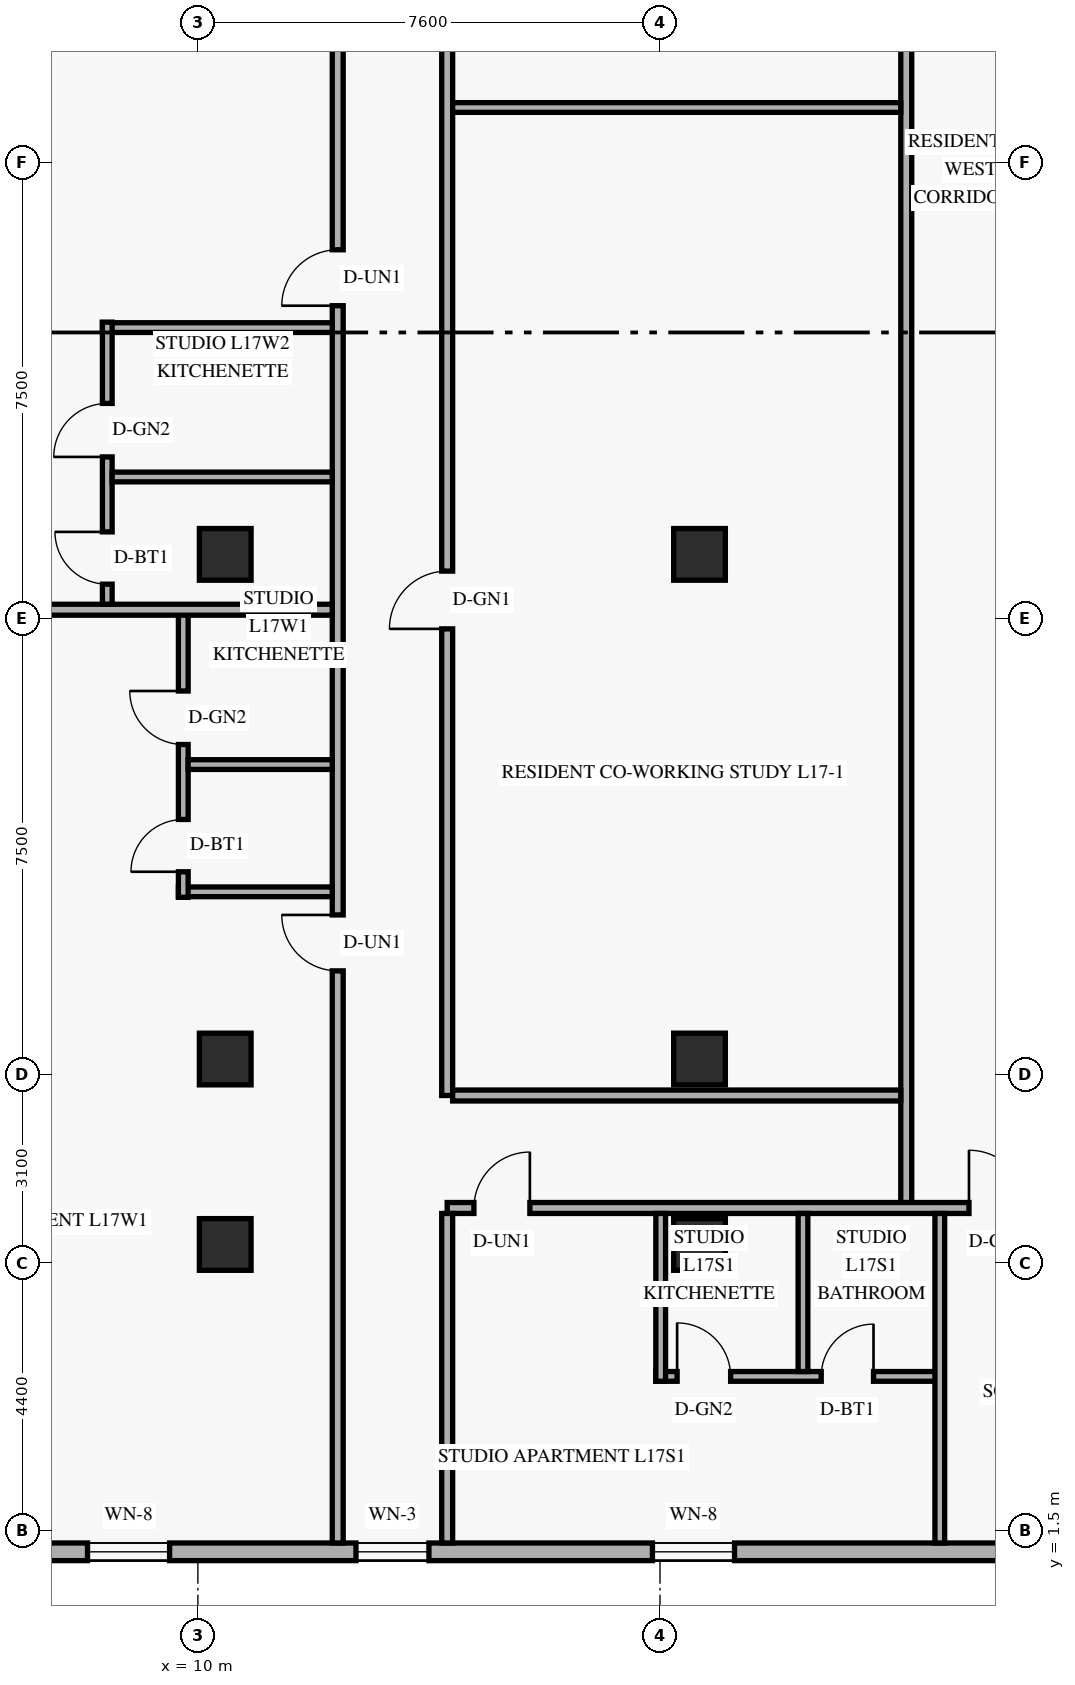
"""IFC4 building model, lengths in metres.
Left out: names, types, materials, properties, quantities, classifications, styles, units other than length and angle.
Written with IfcOpenShell. Run it as: python <this file> out.ifc"""

import sys

from ifc_helpers import new_model, si_unit, direction, frame, frame_2d, origin, origin_2d, place, context, subcontext, project, spatial, rectangle, extrude, element, fill, save


model = new_model("IFC4")
c1 = context("Model", 3, precision=1e-05, world=origin(), true_north=direction((0.0, 1.0)))
c2 = subcontext(c1, "Body", "Model", "MODEL_VIEW")
j1 = project(units=[si_unit("LENGTHUNIT", "METRE"), si_unit("PLANEANGLEUNIT", "RADIAN")], contexts=[c1])
p1 = place(None, origin())
s1 = spatial("IfcSite", under=j1, at=p1, CompositionType="ELEMENT")
p2 = place(p1, origin())
s2 = spatial("IfcBuilding", under=s1, at=p2, CompositionType="ELEMENT")
p3 = place(p2, frame((0.0, 0.0, 67.8)))
s3 = spatial("IfcBuildingStorey", under=s2, at=p3, CompositionType="ELEMENT", Elevation=67.8)
for number, where, z_axis, x_axis in (
    (1, (10.45, 6.2, 0.0), (0.0, 0.0, 1.0), (1.0, 0.0, 0.0)),
    (2, (10.45, 9.25, 0.0), (0.0, 0.0, 1.0), (1.0, 0.0, 0.0)),
    (3, (10.45, 17.55, 0.0), (0.0, 0.0, 1.0), (1.0, 0.0, 0.0)),
    (4, (18.25, 6.2, 0.0), (0.0, 0.0, 1.0), (1.0, 0.0, 0.0)),
    (5, (18.25, 9.25, 0.0), (0.0, 0.0, 1.0), (1.0, 0.0, 0.0)),
    (6, (18.25, 17.55, 0.0), (0.0, 0.0, 1.0), (1.0, 0.0, 0.0)),
):
    element("IfcColumn", number, at=place(p3, frame(where, z_axis=z_axis, x_axis=x_axis)), inside=s3, PredefinedType="COLUMN", context=c2, shape_type="SweptSolid", body=[
        extrude(rectangle(XDim=0.85, YDim=0.85, at=origin_2d()), origin(), (0.0, 0.0, 1.0), 3.6),
    ])
p4 = place(p3, frame((5.42, 1.145, 0.0), z_axis=(0.0, 0.0, 1.0), x_axis=(1.0, 0.0, 0.0)))
e7 = element("IfcWall", 7, at=p4, inside=s3, PredefinedType="SOLIDWALL", context=c2, shape_type="SweptSolid", body=[
    extrude(rectangle(XDim=39.56, YDim=0.29, at=frame_2d((19.78, 0.0))), origin(), (0.0, 0.0, 1.0), 3.3),
])
p5 = place(p4, frame((2.765, 0.0, 0.85)))
e8 = element("IfcOpeningElement", 8, at=p5, cuts=e7, PredefinedType="OPENING", context=c2, shape_type="SweptSolid", body=[
    extrude(rectangle(XDim=1.35, YDim=1.55, at=frame_2d((0.675, 0.775))), frame((0.0, 0.155, 0.0), z_axis=(0.0, -1.0, 0.0), x_axis=(1.0, 0.0, 0.0)), (0.0, 0.0, 1.0), 0.31),
])
p6 = place(p4, frame((7.18, 0.0, 0.85)))
e9 = element("IfcOpeningElement", 9, at=p6, cuts=e7, PredefinedType="OPENING", context=c2, shape_type="SweptSolid", body=[
    extrude(rectangle(XDim=1.2, YDim=1.5, at=frame_2d((0.6, 0.75))), frame((0.0, 0.155, 0.0), z_axis=(0.0, -1.0, 0.0), x_axis=(1.0, 0.0, 0.0)), (0.0, 0.0, 1.0), 0.31),
])
p7 = place(p4, frame((12.056, 0.0, 0.85)))
e10 = element("IfcOpeningElement", 10, at=p7, cuts=e7, PredefinedType="OPENING", context=c2, shape_type="SweptSolid", body=[
    extrude(rectangle(XDim=1.35, YDim=1.55, at=frame_2d((0.675, 0.775))), frame((0.0, 0.155, 0.0), z_axis=(0.0, -1.0, 0.0), x_axis=(1.0, 0.0, 0.0)), (0.0, 0.0, 1.0), 0.31),
])
p8 = place(p4, frame((18.665, 0.0, 0.85)))
e11 = element("IfcOpeningElement", 11, at=p8, cuts=e7, PredefinedType="OPENING", context=c2, shape_type="SweptSolid", body=[
    extrude(rectangle(XDim=1.35, YDim=1.55, at=frame_2d((0.675, 0.775))), frame((0.0, 0.155, 0.0), z_axis=(0.0, -1.0, 0.0), x_axis=(1.0, 0.0, 0.0)), (0.0, 0.0, 1.0), 0.31),
])
p9 = place(p4, frame((25.274, 0.0, 0.85)))
e12 = element("IfcOpeningElement", 12, at=p9, cuts=e7, PredefinedType="OPENING", context=c2, shape_type="SweptSolid", body=[
    extrude(rectangle(XDim=1.35, YDim=1.55, at=frame_2d((0.675, 0.775))), frame((0.0, 0.155, 0.0), z_axis=(0.0, -1.0, 0.0), x_axis=(1.0, 0.0, 0.0)), (0.0, 0.0, 1.0), 0.31),
])
p10 = place(p4, frame((30.39, 0.0, 0.85)))
e13 = element("IfcOpeningElement", 13, at=p10, cuts=e7, PredefinedType="OPENING", context=c2, shape_type="SweptSolid", body=[
    extrude(rectangle(XDim=1.35, YDim=1.55, at=frame_2d((0.675, 0.775))), frame((0.0, 0.155, 0.0), z_axis=(0.0, -1.0, 0.0), x_axis=(1.0, 0.0, 0.0)), (0.0, 0.0, 1.0), 0.31),
])
p11 = place(p4, frame((35.17, 0.0, 0.85)))
e14 = element("IfcOpeningElement", 14, at=p11, cuts=e7, PredefinedType="OPENING", context=c2, shape_type="SweptSolid", body=[
    extrude(rectangle(XDim=1.35, YDim=1.55, at=frame_2d((0.675, 0.775))), frame((0.0, 0.155, 0.0), z_axis=(0.0, -1.0, 0.0), x_axis=(1.0, 0.0, 0.0)), (0.0, 0.0, 1.0), 0.31),
])
p12 = place(p3, frame((21.65, 6.8, 0.0), z_axis=(0.0, 0.0, 1.0), x_axis=(0.0, 1.0, 0.0)))
e15 = element("IfcWall", 15, at=p12, inside=s3, PredefinedType="STANDARD", context=c2, shape_type="SweptSolid", body=[
    extrude(rectangle(XDim=34.4, YDim=0.18, at=frame_2d((17.2, 0.0))), origin(), (0.0, 0.0, 1.0), 2.589),
])
p13 = place(p3, frame((14.1, 6.8, 0.0), z_axis=(0.0, 0.0, 1.0), x_axis=(1.0, 0.0, 0.0)))
e16 = element("IfcWall", 16, at=p13, inside=s3, PredefinedType="STANDARD", context=c2, shape_type="SweptSolid", body=[
    extrude(rectangle(XDim=21.32, YDim=0.18, at=frame_2d((10.66, 0.0))), origin(), (0.0, 0.0, 1.0), 2.589),
])
p14 = place(p13, frame((0.44, 0.0, 0.0)))
e17 = element("IfcOpeningElement", 17, at=p14, cuts=e16, PredefinedType="OPENING", context=c2, shape_type="SweptSolid", body=[
    extrude(rectangle(XDim=0.92, YDim=2.15, at=frame_2d((0.46, 1.075))), frame((0.0, 0.1, 0.0), z_axis=(0.0, -1.0, 0.0), x_axis=(1.0, 0.0, 0.0)), (0.0, 0.0, 1.0), 0.2),
])
p15 = place(p13, frame((8.582, 0.0, 0.0)))
e18 = element("IfcOpeningElement", 18, at=p15, cuts=e16, PredefinedType="OPENING", context=c2, shape_type="SweptSolid", body=[
    extrude(rectangle(XDim=0.95, YDim=2.15, at=frame_2d((0.475, 1.075))), frame((0.0, 0.1, 0.0), z_axis=(0.0, -1.0, 0.0), x_axis=(1.0, 0.0, 0.0)), (0.0, 0.0, 1.0), 0.2),
])
p16 = place(p13, frame((13.658, 0.0, 0.0)))
e19 = element("IfcOpeningElement", 19, at=p16, cuts=e16, PredefinedType="OPENING", context=c2, shape_type="SweptSolid", body=[
    extrude(rectangle(XDim=0.92, YDim=2.15, at=frame_2d((0.46, 1.075))), frame((0.0, 0.1, 0.0), z_axis=(0.0, -1.0, 0.0), x_axis=(1.0, 0.0, 0.0)), (0.0, 0.0, 1.0), 0.2),
])
p17 = place(p3, frame((12.3, 1.29, 0.0), z_axis=(0.0, 0.0, 1.0), x_axis=(0.0, 1.0, 0.0)))
e20 = element("IfcWall", 20, at=p17, inside=s3, PredefinedType="STANDARD", context=c2, shape_type="SweptSolid", body=[
    extrude(rectangle(XDim=45.42, YDim=0.18, at=frame_2d((22.71, 0.0))), origin(), (0.0, 0.0, 1.0), 2.589),
])
p18 = place(p17, frame((9.41, 0.0, 0.0)))
e21 = element("IfcOpeningElement", 21, at=p18, cuts=e20, PredefinedType="OPENING", context=c2, shape_type="SweptSolid", body=[
    extrude(rectangle(XDim=0.92, YDim=2.15, at=frame_2d((0.46, 1.075))), frame((0.0, 0.1, 0.0), z_axis=(0.0, -1.0, 0.0), x_axis=(1.0, 0.0, 0.0)), (0.0, 0.0, 1.0), 0.2),
])
p19 = place(p17, frame((20.35, 0.0, 0.0)))
e22 = element("IfcOpeningElement", 22, at=p19, cuts=e20, PredefinedType="OPENING", context=c2, shape_type="SweptSolid", body=[
    extrude(rectangle(XDim=0.92, YDim=2.15, at=frame_2d((0.46, 1.075))), frame((0.0, 0.1, 0.0), z_axis=(0.0, -1.0, 0.0), x_axis=(1.0, 0.0, 0.0)), (0.0, 0.0, 1.0), 0.2),
])
p20 = place(p17, frame((35.99, 0.0, 0.0)))
e23 = element("IfcOpeningElement", 23, at=p20, cuts=e20, PredefinedType="OPENING", context=c2, shape_type="SweptSolid", body=[
    extrude(rectangle(XDim=0.92, YDim=2.15, at=frame_2d((0.46, 1.075))), frame((0.0, 0.1, 0.0), z_axis=(0.0, -1.0, 0.0), x_axis=(1.0, 0.0, 0.0)), (0.0, 0.0, 1.0), 0.2),
])
p21 = place(p3, frame((14.1, 8.65, 0.0), z_axis=(0.0, 0.0, 1.0), x_axis=(0.0, 1.0, 0.0)))
e24 = element("IfcWall", 24, at=p21, inside=s3, PredefinedType="STANDARD", context=c2, shape_type="SweptSolid", body=[
    extrude(rectangle(XDim=30.7, YDim=0.18, at=frame_2d((15.35, 0.0))), origin(), (0.0, 0.0, 1.0), 2.589),
])
p22 = place(p21, frame((7.675, 0.0, 0.0)))
e25 = element("IfcOpeningElement", 25, at=p22, cuts=e24, PredefinedType="OPENING", context=c2, shape_type="SweptSolid", body=[
    extrude(rectangle(XDim=0.95, YDim=2.15, at=frame_2d((0.475, 1.075))), frame((0.0, 0.1, 0.0), z_axis=(0.0, -1.0, 0.0), x_axis=(1.0, 0.0, 0.0)), (0.0, 0.0, 1.0), 0.2),
])
p23 = place(p21, frame((23.025, 0.0, 0.0)))
e26 = element("IfcOpeningElement", 26, at=p23, cuts=e24, PredefinedType="OPENING", context=c2, shape_type="SweptSolid", body=[
    extrude(rectangle(XDim=0.95, YDim=2.15, at=frame_2d((0.475, 1.075))), frame((0.0, 0.1, 0.0), z_axis=(0.0, -1.0, 0.0), x_axis=(1.0, 0.0, 0.0)), (0.0, 0.0, 1.0), 0.2),
])
p24 = place(p3, frame((14.19, 8.65, 0.0), z_axis=(0.0, 0.0, 1.0), x_axis=(1.0, 0.0, 0.0)))
e27 = element("IfcWall", 27, at=p24, inside=s3, PredefinedType="STANDARD", context=c2, shape_type="SweptSolid", body=[
    extrude(rectangle(XDim=7.37, YDim=0.18, at=frame_2d((3.685, 0.0))), origin(), (0.0, 0.0, 1.0), 2.589),
])
p25 = place(p3, frame((14.1, 1.29, 0.0), z_axis=(0.0, 0.0, 1.0), x_axis=(0.0, 1.0, 0.0)))
e28 = element("IfcWall", 28, at=p25, inside=s3, PredefinedType="PARTITIONING", context=c2, shape_type="SweptSolid", body=[
    extrude(rectangle(XDim=5.42, YDim=0.18, at=frame_2d((2.71, 0.0))), origin(), (0.0, 0.0, 1.0), 2.749),
])
p26 = place(p3, frame((9.68, 12.0, 0.0), z_axis=(0.0, 0.0, 1.0), x_axis=(1.0, 0.0, 0.0)))
e29 = element("IfcWall", 29, at=p26, inside=s3, PredefinedType="PLUMBINGWALL", context=c2, shape_type="SweptSolid", body=[
    extrude(rectangle(XDim=2.53, YDim=0.16, at=frame_2d((1.265, 0.0))), origin(), (0.0, 0.0, 1.0), 2.589),
])
p27 = place(p3, frame((9.76, 11.91, 0.0), z_axis=(0.0, 0.0, 1.0), x_axis=(0.0, 1.0, 0.0)))
e30 = element("IfcWall", 30, at=p27, inside=s3, PredefinedType="PLUMBINGWALL", context=c2, shape_type="SweptSolid", body=[
    extrude(rectangle(XDim=4.73, YDim=0.16, at=frame_2d((2.365, 0.0))), origin(), (0.0, 0.0, 1.0), 2.872),
])
p28 = place(p27, frame((0.42, 0.0, 0.0)))
e31 = element("IfcOpeningElement", 31, at=p28, cuts=e30, PredefinedType="OPENING", context=c2, shape_type="SweptSolid", body=[
    extrude(rectangle(XDim=0.86, YDim=2.12, at=frame_2d((0.43, 1.06))), frame((0.0, 0.09, 0.0), z_axis=(0.0, -1.0, 0.0), x_axis=(1.0, 0.0, 0.0)), (0.0, 0.0, 1.0), 0.18),
])
p29 = place(p27, frame((2.513, 0.0, 0.0)))
e32 = element("IfcOpeningElement", 32, at=p29, cuts=e30, PredefinedType="OPENING", context=c2, shape_type="SweptSolid", body=[
    extrude(rectangle(XDim=0.88, YDim=2.12, at=frame_2d((0.44, 1.06))), frame((0.0, 0.09, 0.0), z_axis=(0.0, -1.0, 0.0), x_axis=(1.0, 0.0, 0.0)), (0.0, 0.0, 1.0), 0.18),
])
p30 = place(p3, frame((9.84, 14.093, 0.0), z_axis=(0.0, 0.0, 1.0), x_axis=(1.0, 0.0, 0.0)))
e33 = element("IfcWall", 33, at=p30, inside=s3, PredefinedType="PLUMBINGWALL", context=c2, shape_type="SweptSolid", body=[
    extrude(rectangle(XDim=2.37, YDim=0.16, at=frame_2d((1.185, 0.0))), origin(), (0.0, 0.0, 1.0), 2.589),
])
p31 = place(p3, frame((2.09, 16.64, 0.0), z_axis=(0.0, 0.0, 1.0), x_axis=(1.0, 0.0, 0.0)))
e34 = element("IfcWall", 34, at=p31, inside=s3, PredefinedType="PARTITIONING", context=c2, shape_type="SweptSolid", body=[
    extrude(rectangle(XDim=10.12, YDim=0.18, at=frame_2d((5.06, 0.0))), origin(), (0.0, 0.0, 1.0), 2.589),
])
p32 = place(p3, frame((8.43, 21.28, 0.0), z_axis=(0.0, 0.0, 1.0), x_axis=(1.0, 0.0, 0.0)))
e35 = element("IfcWall", 35, at=p32, inside=s3, PredefinedType="PLUMBINGWALL", context=c2, shape_type="SweptSolid", body=[
    extrude(rectangle(XDim=3.78, YDim=0.16, at=frame_2d((1.89, 0.0))), origin(), (0.0, 0.0, 1.0), 2.589),
])
p33 = place(p3, frame((8.51, 16.73, 0.0), z_axis=(0.0, 0.0, 1.0), x_axis=(0.0, 1.0, 0.0)))
e36 = element("IfcWall", 36, at=p33, inside=s3, PredefinedType="PLUMBINGWALL", context=c2, shape_type="SweptSolid", body=[
    extrude(rectangle(XDim=4.64, YDim=0.16, at=frame_2d((2.32, 0.0))), origin(), (0.0, 0.0, 1.0), 2.589),
])
p34 = place(p33, frame((0.33, 0.0, 0.0)))
e37 = element("IfcOpeningElement", 37, at=p34, cuts=e36, PredefinedType="OPENING", context=c2, shape_type="SweptSolid", body=[
    extrude(rectangle(XDim=0.86, YDim=2.12, at=frame_2d((0.43, 1.06))), frame((0.0, 0.09, 0.0), z_axis=(0.0, -1.0, 0.0), x_axis=(1.0, 0.0, 0.0)), (0.0, 0.0, 1.0), 0.18),
])
p35 = place(p33, frame((2.423, 0.0, 0.0)))
e38 = element("IfcOpeningElement", 38, at=p35, cuts=e36, PredefinedType="OPENING", context=c2, shape_type="SweptSolid", body=[
    extrude(rectangle(XDim=0.88, YDim=2.12, at=frame_2d((0.44, 1.06))), frame((0.0, 0.09, 0.0), z_axis=(0.0, -1.0, 0.0), x_axis=(1.0, 0.0, 0.0)), (0.0, 0.0, 1.0), 0.18),
])
p36 = place(p3, frame((8.59, 18.823, 0.0), z_axis=(0.0, 0.0, 1.0), x_axis=(1.0, 0.0, 0.0)))
e39 = element("IfcWall", 39, at=p36, inside=s3, PredefinedType="PLUMBINGWALL", context=c2, shape_type="SweptSolid", body=[
    extrude(rectangle(XDim=3.62, YDim=0.16, at=frame_2d((1.81, 0.0))), origin(), (0.0, 0.0, 1.0), 2.589),
])
p37 = place(p3, frame((14.19, 24.9, 0.0), z_axis=(0.0, 0.0, 1.0), x_axis=(1.0, 0.0, 0.0)))
e40 = element("IfcWall", 40, at=p37, inside=s3, PredefinedType="PARTITIONING", context=c2, shape_type="SweptSolid", body=[
    extrude(rectangle(XDim=7.37, YDim=0.16, at=frame_2d((3.685, 0.0))), origin(), (0.0, 0.0, 1.0), 2.589),
])
p38 = place(p3, frame((17.531, 4.03, 0.0), z_axis=(0.0, 0.0, 1.0), x_axis=(1.0, 0.0, 0.0)))
e41 = element("IfcWall", 41, at=p38, inside=s3, PredefinedType="PLUMBINGWALL", context=c2, shape_type="SweptSolid", body=[
    extrude(rectangle(XDim=4.67, YDim=0.16, at=frame_2d((2.335, 0.0))), origin(), (0.0, 0.0, 1.0), 3.3),
])
p39 = place(p38, frame((0.35, 0.0, 0.0)))
e42 = element("IfcOpeningElement", 42, at=p39, cuts=e41, PredefinedType="OPENING", context=c2, shape_type="SweptSolid", body=[
    extrude(rectangle(XDim=0.88, YDim=2.12, at=frame_2d((0.44, 1.06))), frame((0.0, 0.09, 0.0), z_axis=(0.0, -1.0, 0.0), x_axis=(1.0, 0.0, 0.0)), (0.0, 0.0, 1.0), 0.18),
])
p40 = place(p38, frame((2.72, 0.0, 0.0)))
e43 = element("IfcOpeningElement", 43, at=p40, cuts=e41, PredefinedType="OPENING", context=c2, shape_type="SweptSolid", body=[
    extrude(rectangle(XDim=0.86, YDim=2.12, at=frame_2d((0.43, 1.06))), frame((0.0, 0.09, 0.0), z_axis=(0.0, -1.0, 0.0), x_axis=(1.0, 0.0, 0.0)), (0.0, 0.0, 1.0), 0.18),
])
p41 = place(p3, frame((17.612, 3.95, 0.0), z_axis=(0.0, 0.0, 1.0), x_axis=(0.0, 1.0, 0.0)))
e44 = element("IfcWall", 44, at=p41, inside=s3, PredefinedType="PLUMBINGWALL", context=c2, shape_type="SweptSolid", body=[
    extrude(rectangle(XDim=2.76, YDim=0.16, at=frame_2d((1.38, 0.0))), origin(), (0.0, 0.0, 1.0), 2.749),
])
p42 = place(p3, frame((19.952, 4.11, 0.0), z_axis=(0.0, 0.0, 1.0), x_axis=(0.0, 1.0, 0.0)))
e45 = element("IfcWall", 45, at=p42, inside=s3, PredefinedType="PLUMBINGWALL", context=c2, shape_type="SweptSolid", body=[
    extrude(rectangle(XDim=2.6, YDim=0.16, at=frame_2d((1.3, 0.0))), origin(), (0.0, 0.0, 1.0), 2.749),
])
p43 = place(p3, frame((22.202, 1.29, 0.0), z_axis=(0.0, 0.0, 1.0), x_axis=(0.0, 1.0, 0.0)))
e46 = element("IfcWall", 46, at=p43, inside=s3, PredefinedType="PARTITIONING", context=c2, shape_type="SweptSolid", body=[
    extrude(rectangle(XDim=5.42, YDim=0.16, at=frame_2d((2.71, 0.0))), origin(), (0.0, 0.0, 1.0), 2.749),
])
p44 = place(p5, origin())
e47 = element("IfcWindow", 47, at=p44, inside=s3, PartitioningType="SINGLE_PANEL", PredefinedType="WINDOW", context=c2, shape_type="SweptSolid", body=[
    extrude(rectangle(XDim=1.35, YDim=1.55, at=frame_2d((0.675, 0.775))), frame((0.0, 0.03, 0.0), z_axis=(0.0, -1.0, 0.0), x_axis=(1.0, 0.0, 0.0)), (0.0, 0.0, 1.0), 0.06),
])
fill(e8, e47)
p45 = place(p6, origin())
e48 = element("IfcWindow", 48, at=p45, inside=s3, PartitioningType="SINGLE_PANEL", PredefinedType="WINDOW", context=c2, shape_type="SweptSolid", body=[
    extrude(rectangle(XDim=1.2, YDim=1.5, at=frame_2d((0.6, 0.75))), frame((0.0, 0.03, 0.0), z_axis=(0.0, -1.0, 0.0), x_axis=(1.0, 0.0, 0.0)), (0.0, 0.0, 1.0), 0.06),
])
fill(e9, e48)
p46 = place(p7, origin())
e49 = element("IfcWindow", 49, at=p46, inside=s3, PartitioningType="SINGLE_PANEL", PredefinedType="WINDOW", context=c2, shape_type="SweptSolid", body=[
    extrude(rectangle(XDim=1.35, YDim=1.55, at=frame_2d((0.675, 0.775))), frame((0.0, 0.03, 0.0), z_axis=(0.0, -1.0, 0.0), x_axis=(1.0, 0.0, 0.0)), (0.0, 0.0, 1.0), 0.06),
])
fill(e10, e49)
p47 = place(p18, origin())
e50 = element("IfcDoor", 50, at=p47, inside=s3, OperationType="SINGLE_SWING_RIGHT", PredefinedType="DOOR", context=c2, shape_type="SweptSolid", body=[
    extrude(rectangle(XDim=0.92, YDim=2.15, at=frame_2d((0.46, 1.075))), frame((0.0, 0.025, 0.0), z_axis=(0.0, -1.0, 0.0), x_axis=(1.0, 0.0, 0.0)), (0.0, 0.0, 1.0), 0.05),
])
fill(e21, e50)
p48 = place(p28, origin())
e51 = element("IfcDoor", 51, at=p48, inside=s3, OperationType="SINGLE_SWING_LEFT", PredefinedType="DOOR", context=c2, shape_type="SweptSolid", body=[
    extrude(rectangle(XDim=0.86, YDim=2.12, at=frame_2d((0.43, 1.06))), frame((0.0, 0.025, 0.0), z_axis=(0.0, -1.0, 0.0), x_axis=(1.0, 0.0, 0.0)), (0.0, 0.0, 1.0), 0.05),
])
fill(e31, e51)
p49 = place(p29, origin())
e52 = element("IfcDoor", 52, at=p49, inside=s3, OperationType="SINGLE_SWING_RIGHT", PredefinedType="DOOR", context=c2, shape_type="SweptSolid", body=[
    extrude(rectangle(XDim=0.88, YDim=2.12, at=frame_2d((0.44, 1.06))), frame((0.0, 0.025, 0.0), z_axis=(0.0, -1.0, 0.0), x_axis=(1.0, 0.0, 0.0)), (0.0, 0.0, 1.0), 0.05),
])
fill(e32, e52)
p50 = place(p19, origin())
e53 = element("IfcDoor", 53, at=p50, inside=s3, OperationType="SINGLE_SWING_LEFT", PredefinedType="DOOR", context=c2, shape_type="SweptSolid", body=[
    extrude(rectangle(XDim=0.92, YDim=2.15, at=frame_2d((0.46, 1.075))), frame((0.0, 0.025, 0.0), z_axis=(0.0, -1.0, 0.0), x_axis=(1.0, 0.0, 0.0)), (0.0, 0.0, 1.0), 0.05),
])
fill(e22, e53)
p51 = place(p34, origin())
e54 = element("IfcDoor", 54, at=p51, inside=s3, OperationType="SINGLE_SWING_RIGHT", PredefinedType="DOOR", context=c2, shape_type="SweptSolid", body=[
    extrude(rectangle(XDim=0.86, YDim=2.12, at=frame_2d((0.43, 1.06))), frame((0.0, 0.025, 0.0), z_axis=(0.0, -1.0, 0.0), x_axis=(1.0, 0.0, 0.0)), (0.0, 0.0, 1.0), 0.05),
])
fill(e37, e54)
p52 = place(p35, origin())
e55 = element("IfcDoor", 55, at=p52, inside=s3, OperationType="SINGLE_SWING_LEFT", PredefinedType="DOOR", context=c2, shape_type="SweptSolid", body=[
    extrude(rectangle(XDim=0.88, YDim=2.12, at=frame_2d((0.44, 1.06))), frame((0.0, 0.025, 0.0), z_axis=(0.0, -1.0, 0.0), x_axis=(1.0, 0.0, 0.0)), (0.0, 0.0, 1.0), 0.05),
])
fill(e38, e55)
p53 = place(p22, origin())
e56 = element("IfcDoor", 56, at=p53, inside=s3, OperationType="SINGLE_SWING_LEFT", PredefinedType="DOOR", context=c2, shape_type="SweptSolid", body=[
    extrude(rectangle(XDim=0.95, YDim=2.15, at=frame_2d((0.475, 1.075))), frame((0.0, 0.025, 0.0), z_axis=(0.0, -1.0, 0.0), x_axis=(1.0, 0.0, 0.0)), (0.0, 0.0, 1.0), 0.05),
])
fill(e25, e56)
p54 = place(p14, origin())
e57 = element("IfcDoor", 57, at=p54, inside=s3, OperationType="SINGLE_SWING_RIGHT", PredefinedType="DOOR", context=c2, shape_type="SweptSolid", body=[
    extrude(rectangle(XDim=0.92, YDim=2.15, at=frame_2d((0.46, 1.075))), frame((0.0, 0.025, 0.0), z_axis=(0.0, -1.0, 0.0), x_axis=(1.0, 0.0, 0.0)), (0.0, 0.0, 1.0), 0.05),
])
fill(e17, e57)
p55 = place(p39, origin())
e58 = element("IfcDoor", 58, at=p55, inside=s3, OperationType="SINGLE_SWING_LEFT", PredefinedType="DOOR", context=c2, shape_type="SweptSolid", body=[
    extrude(rectangle(XDim=0.88, YDim=2.12, at=frame_2d((0.44, 1.06))), frame((0.0, 0.025, 0.0), z_axis=(0.0, -1.0, 0.0), x_axis=(1.0, 0.0, 0.0)), (0.0, 0.0, 1.0), 0.05),
])
fill(e42, e58)
p56 = place(p40, origin())
e59 = element("IfcDoor", 59, at=p56, inside=s3, OperationType="SINGLE_SWING_RIGHT", PredefinedType="DOOR", context=c2, shape_type="SweptSolid", body=[
    extrude(rectangle(XDim=0.86, YDim=2.12, at=frame_2d((0.43, 1.06))), frame((0.0, 0.025, 0.0), z_axis=(0.0, -1.0, 0.0), x_axis=(1.0, 0.0, 0.0)), (0.0, 0.0, 1.0), 0.05),
])
fill(e43, e59)
p57 = place(p15, origin())
e60 = element("IfcDoor", 60, at=p57, inside=s3, OperationType="SINGLE_SWING_LEFT", PredefinedType="DOOR", context=c2, shape_type="SweptSolid", body=[
    extrude(rectangle(XDim=0.95, YDim=2.15, at=frame_2d((0.475, 1.075))), frame((0.0, 0.025, 0.0), z_axis=(0.0, -1.0, 0.0), x_axis=(1.0, 0.0, 0.0)), (0.0, 0.0, 1.0), 0.05),
])
fill(e18, e60)
save(model, sys.argv[1])
